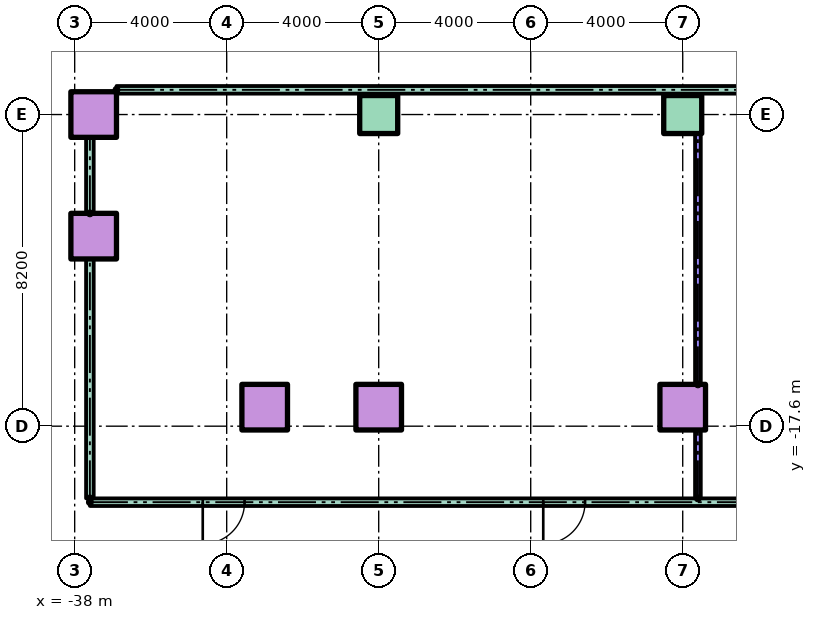
"""IFC4 building model, lengths in metres.
Left out: names, types, materials, properties, quantities, classifications, styles, units other than length and angle.
Written with IfcOpenShell. Run it as: python <this file> out.ifc"""

import sys

from ifc_helpers import new_model, si_unit, direction, frame, frame_2d, origin, origin_2d, place, context, subcontext, project, spatial, rectangle, hollow_rectangle, extrude, element, fill, save


model = new_model("IFC4")
c1 = context("Model", 3, precision=1e-05, world=origin(), true_north=direction((0.0, 1.0)))
c2 = subcontext(c1, "Body", "Model", "MODEL_VIEW")
j1 = project(units=[si_unit("LENGTHUNIT", "METRE"), si_unit("PLANEANGLEUNIT", "RADIAN")], contexts=[c1])
p1 = place(None, origin())
s1 = spatial("IfcSite", under=j1, at=p1, CompositionType="ELEMENT")
p2 = place(p1, origin())
s2 = spatial("IfcBuilding", under=s1, at=p2, CompositionType="ELEMENT")
p3 = place(p2, frame((0.0, 0.0, 10.0)))
s3 = spatial("IfcBuildingStorey", under=s2, at=p3, CompositionType="ELEMENT", Elevation=10.0)
for number, where in (
    (1, (-33.0, -17.1, 0.0)),
    (2, (-30.0, -17.1, 0.0)),
    (3, (-22.0, -17.1, 0.0)),
    (4, (-37.5, -12.6, 0.0)),
    (5, (-37.5, -9.4, 0.0)),
):
    element("IfcColumn", number, at=place(p3, frame(where)), inside=s3, PredefinedType="COLUMN", context=c2, shape_type="SweptSolid", body=[
        extrude(hollow_rectangle(XDim=1.2, YDim=1.2, WallThickness=0.06, at=origin_2d()), origin(), (0.0, 0.0, 1.0), 4.0),
    ])
for number, where in (
    (6, (-30.0, -9.4, 0.0)),
    (7, (-22.0, -9.4, 0.0)),
):
    element("IfcColumn", number, at=place(p3, frame(where)), inside=s3, PredefinedType="COLUMN", context=c2, shape_type="SweptSolid", body=[
        extrude(rectangle(XDim=1.0, YDim=1.0, at=origin_2d()), origin(), (0.0, 0.0, 1.0), 4.0),
    ])
p4 = place(p3, frame((-37.6, -19.6, 0.0)))
e8 = element("IfcWall", 8, at=p4, inside=s3, PredefinedType="PARTITIONING", context=c2, shape_type="SweptSolid", body=[
    extrude(rectangle(XDim=75.2, YDim=0.2, at=frame_2d((37.6, 0.0))), origin(), (0.0, 0.0, 1.0), 3.7),
])
p5 = place(p4, frame((2.97, 0.0, 0.0)))
e9 = element("IfcOpeningElement", 9, at=p5, cuts=e8, PredefinedType="OPENING", context=c2, shape_type="SweptSolid", body=[
    extrude(rectangle(XDim=1.1, YDim=2.1, at=frame_2d((0.55, 1.05))), frame((0.0, 0.11, 0.0), z_axis=(0.0, -1.0, 0.0), x_axis=(1.0, 0.0, 0.0)), (0.0, 0.0, 1.0), 0.22),
])
p6 = place(p4, frame((11.93, 0.0, 0.0)))
e10 = element("IfcOpeningElement", 10, at=p6, cuts=e8, PredefinedType="OPENING", context=c2, shape_type="SweptSolid", body=[
    extrude(rectangle(XDim=1.1, YDim=2.1, at=frame_2d((0.55, 1.05))), frame((0.0, 0.11, 0.0), z_axis=(0.0, -1.0, 0.0), x_axis=(1.0, 0.0, 0.0)), (0.0, 0.0, 1.0), 0.22),
])
p7 = place(p4, frame((21.5, 0.0, 0.0)))
e11 = element("IfcOpeningElement", 11, at=p7, cuts=e8, PredefinedType="OPENING", context=c2, shape_type="SweptSolid", body=[
    extrude(rectangle(XDim=1.0, YDim=2.1, at=frame_2d((0.5, 1.05))), frame((0.0, 0.11, 0.0), z_axis=(0.0, -1.0, 0.0), x_axis=(1.0, 0.0, 0.0)), (0.0, 0.0, 1.0), 0.22),
])
p8 = place(p4, frame((32.5, 0.0, 0.0)))
e12 = element("IfcOpeningElement", 12, at=p8, cuts=e8, PredefinedType="OPENING", context=c2, shape_type="SweptSolid", body=[
    extrude(rectangle(XDim=1.0, YDim=2.1, at=frame_2d((0.5, 1.05))), frame((0.0, 0.11, 0.0), z_axis=(0.0, -1.0, 0.0), x_axis=(1.0, 0.0, 0.0)), (0.0, 0.0, 1.0), 0.22),
])
p9 = place(p4, frame((41.5, 0.0, 0.0)))
e13 = element("IfcOpeningElement", 13, at=p9, cuts=e8, PredefinedType="OPENING", context=c2, shape_type="SweptSolid", body=[
    extrude(rectangle(XDim=1.0, YDim=2.1, at=frame_2d((0.5, 1.05))), frame((0.0, 0.11, 0.0), z_axis=(0.0, -1.0, 0.0), x_axis=(1.0, 0.0, 0.0)), (0.0, 0.0, 1.0), 0.22),
])
p10 = place(p4, frame((50.5, 0.0, 0.0)))
e14 = element("IfcOpeningElement", 14, at=p10, cuts=e8, PredefinedType="OPENING", context=c2, shape_type="SweptSolid", body=[
    extrude(rectangle(XDim=1.0, YDim=2.1, at=frame_2d((0.5, 1.05))), frame((0.0, 0.11, 0.0), z_axis=(0.0, -1.0, 0.0), x_axis=(1.0, 0.0, 0.0)), (0.0, 0.0, 1.0), 0.22),
])
p11 = place(p4, frame((59.724, 0.0, 0.0)))
e15 = element("IfcOpeningElement", 15, at=p11, cuts=e8, PredefinedType="OPENING", context=c2, shape_type="SweptSolid", body=[
    extrude(rectangle(XDim=1.0, YDim=2.1, at=frame_2d((0.5, 1.05))), frame((0.0, 0.11, 0.0), z_axis=(0.0, -1.0, 0.0), x_axis=(1.0, 0.0, 0.0)), (0.0, 0.0, 1.0), 0.22),
])
p12 = place(p4, frame((70.476, 0.0, 0.0)))
e16 = element("IfcOpeningElement", 16, at=p12, cuts=e8, PredefinedType="OPENING", context=c2, shape_type="SweptSolid", body=[
    extrude(rectangle(XDim=1.0, YDim=2.1, at=frame_2d((0.5, 1.05))), frame((0.0, 0.11, 0.0), z_axis=(0.0, -1.0, 0.0), x_axis=(1.0, 0.0, 0.0)), (0.0, 0.0, 1.0), 0.22),
])
p13 = place(p3, frame((-36.9, -8.75, 0.0)))
e17 = element("IfcWall", 17, at=p13, inside=s3, PredefinedType="PARTITIONING", context=c2, shape_type="SweptSolid", body=[
    extrude(rectangle(XDim=73.8, YDim=0.2, at=frame_2d((36.9, 0.0))), origin(), (0.0, 0.0, 1.0), 3.7),
])
p14 = place(p3, frame((-37.6, -19.5, 0.0), z_axis=(0.0, 0.0, 1.0), x_axis=(0.0, 1.0, 0.0)))
e18 = element("IfcWall", 18, at=p14, inside=s3, PredefinedType="PARTITIONING", context=c2, shape_type="SweptSolid", body=[
    extrude(rectangle(XDim=6.3, YDim=0.2, at=frame_2d((3.15, 0.0))), origin(), (0.0, 0.0, 1.0), 3.7),
])
p15 = place(p3, frame((-37.6, -12.0, 0.0), z_axis=(0.0, 0.0, 1.0), x_axis=(0.0, 1.0, 0.0)))
e19 = element("IfcWall", 19, at=p15, inside=s3, PredefinedType="PARTITIONING", context=c2, shape_type="SweptSolid", body=[
    extrude(rectangle(XDim=2.0, YDim=0.2, at=frame_2d((1.0, 0.0))), origin(), (0.0, 0.0, 1.0), 3.7),
])
p16 = place(p3, frame((-21.6, -19.5, 0.0), z_axis=(0.0, 0.0, 1.0), x_axis=(0.0, 1.0, 0.0)))
e20 = element("IfcWall", 20, at=p16, inside=s3, PredefinedType="PARTITIONING", context=c2, shape_type="SweptSolid", body=[
    extrude(rectangle(XDim=1.8, YDim=0.15, at=frame_2d((0.9, 0.0))), origin(), (0.0, 0.0, 1.0), 3.7),
])
p17 = place(p3, frame((-21.6, -16.5, 0.0), z_axis=(0.0, 0.0, 1.0), x_axis=(0.0, 1.0, 0.0)))
e21 = element("IfcWall", 21, at=p17, inside=s3, PredefinedType="PARTITIONING", context=c2, shape_type="SweptSolid", body=[
    extrude(rectangle(XDim=6.6, YDim=0.15, at=frame_2d((3.3, 0.0))), origin(), (0.0, 0.0, 1.0), 3.7),
])
p18 = place(p5, frame((1.1, 0.0, 0.0), z_axis=(0.0, 0.0, 1.0), x_axis=(-1.0, 0.0, 0.0)))
e22 = element("IfcDoor", 22, at=p18, inside=s3, OperationType="SINGLE_SWING_LEFT", PredefinedType="DOOR", context=c2, shape_type="SweptSolid", body=[
    extrude(rectangle(XDim=1.1, YDim=2.1, at=frame_2d((0.55, 1.05))), frame((0.0, 0.025, 0.0), z_axis=(0.0, -1.0, 0.0), x_axis=(1.0, 0.0, 0.0)), (0.0, 0.0, 1.0), 0.05),
])
fill(e9, e22)
p19 = place(p6, frame((1.1, 0.0, 0.0), z_axis=(0.0, 0.0, 1.0), x_axis=(-1.0, 0.0, 0.0)))
e23 = element("IfcDoor", 23, at=p19, inside=s3, OperationType="SINGLE_SWING_LEFT", PredefinedType="DOOR", context=c2, shape_type="SweptSolid", body=[
    extrude(rectangle(XDim=1.1, YDim=2.1, at=frame_2d((0.55, 1.05))), frame((0.0, 0.025, 0.0), z_axis=(0.0, -1.0, 0.0), x_axis=(1.0, 0.0, 0.0)), (0.0, 0.0, 1.0), 0.05),
])
fill(e10, e23)
save(model, sys.argv[1])
